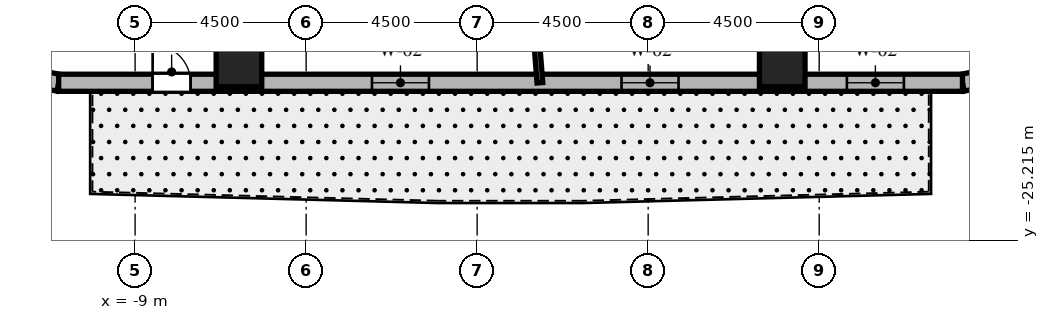
"""IFC4 building model, lengths in metres.
Left out: names, types, materials, properties, quantities, classifications, styles, units other than length and angle.
Written with IfcOpenShell. Run it as: python <this file> out.ifc"""

import sys

from ifc_helpers import new_model, si_unit, direction, frame, frame_2d, origin, origin_2d, place, context, subcontext, project, spatial, rectangle, extrude, element, fill, save


model = new_model("IFC4")
c1 = context("Model", 3, precision=1e-05, world=origin(), true_north=direction((0.0, 1.0)))
c2 = subcontext(c1, "Body", "Model", "MODEL_VIEW")
j1 = project(units=[si_unit("LENGTHUNIT", "METRE"), si_unit("PLANEANGLEUNIT", "RADIAN")], contexts=[c1])
p1 = place(None, origin())
s1 = spatial("IfcSite", under=j1, at=p1, CompositionType="ELEMENT")
p2 = place(p1, origin())
s2 = spatial("IfcBuilding", under=s1, at=p2, CompositionType="ELEMENT")
p3 = place(p2, frame((0.0, 0.0, 91.4)))
s3 = spatial("IfcBuildingStorey", under=s2, at=p3, CompositionType="ELEMENT", Elevation=91.4)
for number, where, z_axis, x_axis in (
    (1, (-6.268, -20.58, 0.0), (0.0, 0.0, 1.0), (1.0, 0.0, 0.0)),
    (2, (8.028, -20.58, 0.0), (0.0, 0.0, 1.0), (1.0, 0.0, 0.0)),
):
    element("IfcColumn", number, at=place(p3, frame(where, z_axis=z_axis, x_axis=x_axis)), inside=s3, PredefinedType="COLUMN", context=c2, shape_type="SweptSolid", body=[
        extrude(rectangle(XDim=1.2, YDim=1.2, at=origin_2d()), origin(), (0.0, 0.0, 1.0), 3.7),
    ])
p4 = place(p3, frame((-12.259, -20.84, 0.0), z_axis=(0.0, 0.0, 1.0), x_axis=(0.982730354425, -0.185043374624, 0.0)))
e3 = element("IfcWall", 3, at=p4, inside=s3, PredefinedType="SOLIDWALL", context=c2, shape_type="SweptSolid", body=[
    extrude(rectangle(XDim=1.269, YDim=0.45, at=frame_2d((0.635, 0.0))), origin(), (0.0, 0.0, 1.0), 3.4),
])
p5 = place(p3, frame((12.771, -21.075, 0.0), z_axis=(0.0, 0.0, 1.0), x_axis=(0.97874281988, 0.205091424819, 0.0)))
e4 = element("IfcWall", 4, at=p5, inside=s3, PredefinedType="SOLIDWALL", context=c2, shape_type="SweptSolid", body=[
    extrude(rectangle(XDim=1.406, YDim=0.45, at=frame_2d((0.703, 0.0))), origin(), (0.0, 0.0, 1.0), 3.4),
])
p6 = place(p3, frame((-11.012, -21.075, 0.0), z_axis=(0.0, 0.0, 1.0), x_axis=(1.0, 0.0, 0.0)))
e5 = element("IfcWall", 5, at=p6, inside=s3, PredefinedType="SOLIDWALL", context=c2, shape_type="SweptSolid", body=[
    extrude(rectangle(XDim=23.782, YDim=0.45, at=frame_2d((11.891, 0.0))), origin(), (0.0, 0.0, 1.0), 3.4),
])
p7 = place(p6, frame((2.473, 0.0, 0.0)))
e6 = element("IfcOpeningElement", 6, at=p7, cuts=e5, PredefinedType="OPENING", context=c2, shape_type="SweptSolid", body=[
    extrude(rectangle(XDim=1.0, YDim=2.15, at=frame_2d((0.5, 1.075))), frame((0.0, 0.235, 0.0), z_axis=(0.0, -1.0, 0.0), x_axis=(1.0, 0.0, 0.0)), (0.0, 0.0, 1.0), 0.47),
])
p8 = place(p6, frame((8.244, 0.0, 0.8)))
e7 = element("IfcOpeningElement", 7, at=p8, cuts=e5, PredefinedType="OPENING", context=c2, shape_type="SweptSolid", body=[
    extrude(rectangle(XDim=1.5, YDim=1.8, at=frame_2d((0.75, 0.9))), frame((0.0, 0.235, 0.0), z_axis=(0.0, -1.0, 0.0), x_axis=(1.0, 0.0, 0.0)), (0.0, 0.0, 1.0), 0.47),
])
p9 = place(p6, frame((14.811, 0.0, 0.8)))
e8 = element("IfcOpeningElement", 8, at=p9, cuts=e5, PredefinedType="OPENING", context=c2, shape_type="SweptSolid", body=[
    extrude(rectangle(XDim=1.5, YDim=1.8, at=frame_2d((0.75, 0.9))), frame((0.0, 0.235, 0.0), z_axis=(0.0, -1.0, 0.0), x_axis=(1.0, 0.0, 0.0)), (0.0, 0.0, 1.0), 0.47),
])
p10 = place(p6, frame((20.741, 0.0, 0.8)))
e9 = element("IfcOpeningElement", 9, at=p10, cuts=e5, PredefinedType="OPENING", context=c2, shape_type="SweptSolid", body=[
    extrude(rectangle(XDim=1.5, YDim=1.8, at=frame_2d((0.75, 0.9))), frame((0.0, 0.235, 0.0), z_axis=(0.0, -1.0, 0.0), x_axis=(1.0, 0.0, 0.0)), (0.0, 0.0, 1.0), 0.47),
])
p11 = place(p3, frame((-3.0, -9.85, 0.0), z_axis=(0.0, 0.0, 1.0), x_axis=(-0.291352035382, -0.95661590593, 0.0)))
e10 = element("IfcWall", 10, at=p11, inside=s3, PredefinedType="PARTITIONING", context=c2, shape_type="SweptSolid", body=[
    extrude(rectangle(XDim=11.734, YDim=0.15, at=frame_2d((5.867, 0.0))), origin(), (0.0, 0.0, 1.0), 2.54),
])
p12 = place(p3, frame((0.772, -9.85, 0.0), z_axis=(0.0, 0.0, 1.0), x_axis=(0.078125747145, -0.996943512759, 0.0)))
e11 = element("IfcWall", 11, at=p12, inside=s3, PredefinedType="PARTITIONING", context=c2, shape_type="SweptSolid", body=[
    extrude(rectangle(XDim=11.259, YDim=0.15, at=frame_2d((5.63, 0.0))), origin(), (0.0, 0.0, 1.0), 2.54),
])
p13 = place(p3, frame((3.842, -9.85, 0.0), z_axis=(0.0, 0.0, 1.0), x_axis=(0.363432685593, -0.931620460833, 0.0)))
e12 = element("IfcWall", 12, at=p13, inside=s3, PredefinedType="PARTITIONING", context=c2, shape_type="SweptSolid", body=[
    extrude(rectangle(XDim=12.049, YDim=0.15, at=frame_2d((6.024, 0.0))), origin(), (0.0, 0.0, 1.0), 2.54),
])
p14 = place(p3, frame((6.454, -9.85, 0.0), z_axis=(0.0, 0.0, 1.0), x_axis=(0.548052950111, -0.836443640584, 0.0)))
e13 = element("IfcWall", 13, at=p14, inside=s3, PredefinedType="PARTITIONING", context=c2, shape_type="SweptSolid", body=[
    extrude(rectangle(XDim=13.019, YDim=0.15, at=frame_2d((6.51, 0.0))), origin(), (0.0, 0.0, 1.0), 2.54),
])
p15 = place(p7, origin())
e14 = element("IfcDoor", 14, at=p15, inside=s3, OperationType="SINGLE_SWING_LEFT", PredefinedType="DOOR", context=c2, shape_type="SweptSolid", body=[
    extrude(rectangle(XDim=1.0, YDim=2.15, at=frame_2d((0.5, 1.075))), frame((0.0, 0.025, 0.0), z_axis=(0.0, -1.0, 0.0), x_axis=(1.0, 0.0, 0.0)), (0.0, 0.0, 1.0), 0.05),
])
fill(e6, e14)
p16 = place(p8, origin())
e15 = element("IfcWindow", 15, at=p16, inside=s3, PartitioningType="SINGLE_PANEL", PredefinedType="WINDOW", context=c2, shape_type="SweptSolid", body=[
    extrude(rectangle(XDim=1.5, YDim=1.8, at=frame_2d((0.75, 0.9))), frame((0.0, 0.03, 0.0), z_axis=(0.0, -1.0, 0.0), x_axis=(1.0, 0.0, 0.0)), (0.0, 0.0, 1.0), 0.06),
])
fill(e7, e15)
p17 = place(p9, origin())
e16 = element("IfcWindow", 16, at=p17, inside=s3, PartitioningType="SINGLE_PANEL", PredefinedType="WINDOW", context=c2, shape_type="SweptSolid", body=[
    extrude(rectangle(XDim=1.5, YDim=1.8, at=frame_2d((0.75, 0.9))), frame((0.0, 0.03, 0.0), z_axis=(0.0, -1.0, 0.0), x_axis=(1.0, 0.0, 0.0)), (0.0, 0.0, 1.0), 0.06),
])
fill(e8, e16)
p18 = place(p10, origin())
e17 = element("IfcWindow", 17, at=p18, inside=s3, PartitioningType="SINGLE_PANEL", PredefinedType="WINDOW", context=c2, shape_type="SweptSolid", body=[
    extrude(rectangle(XDim=1.5, YDim=1.8, at=frame_2d((0.75, 0.9))), frame((0.0, 0.03, 0.0), z_axis=(0.0, -1.0, 0.0), x_axis=(1.0, 0.0, 0.0)), (0.0, 0.0, 1.0), 0.06),
])
fill(e9, e17)
save(model, sys.argv[1])
